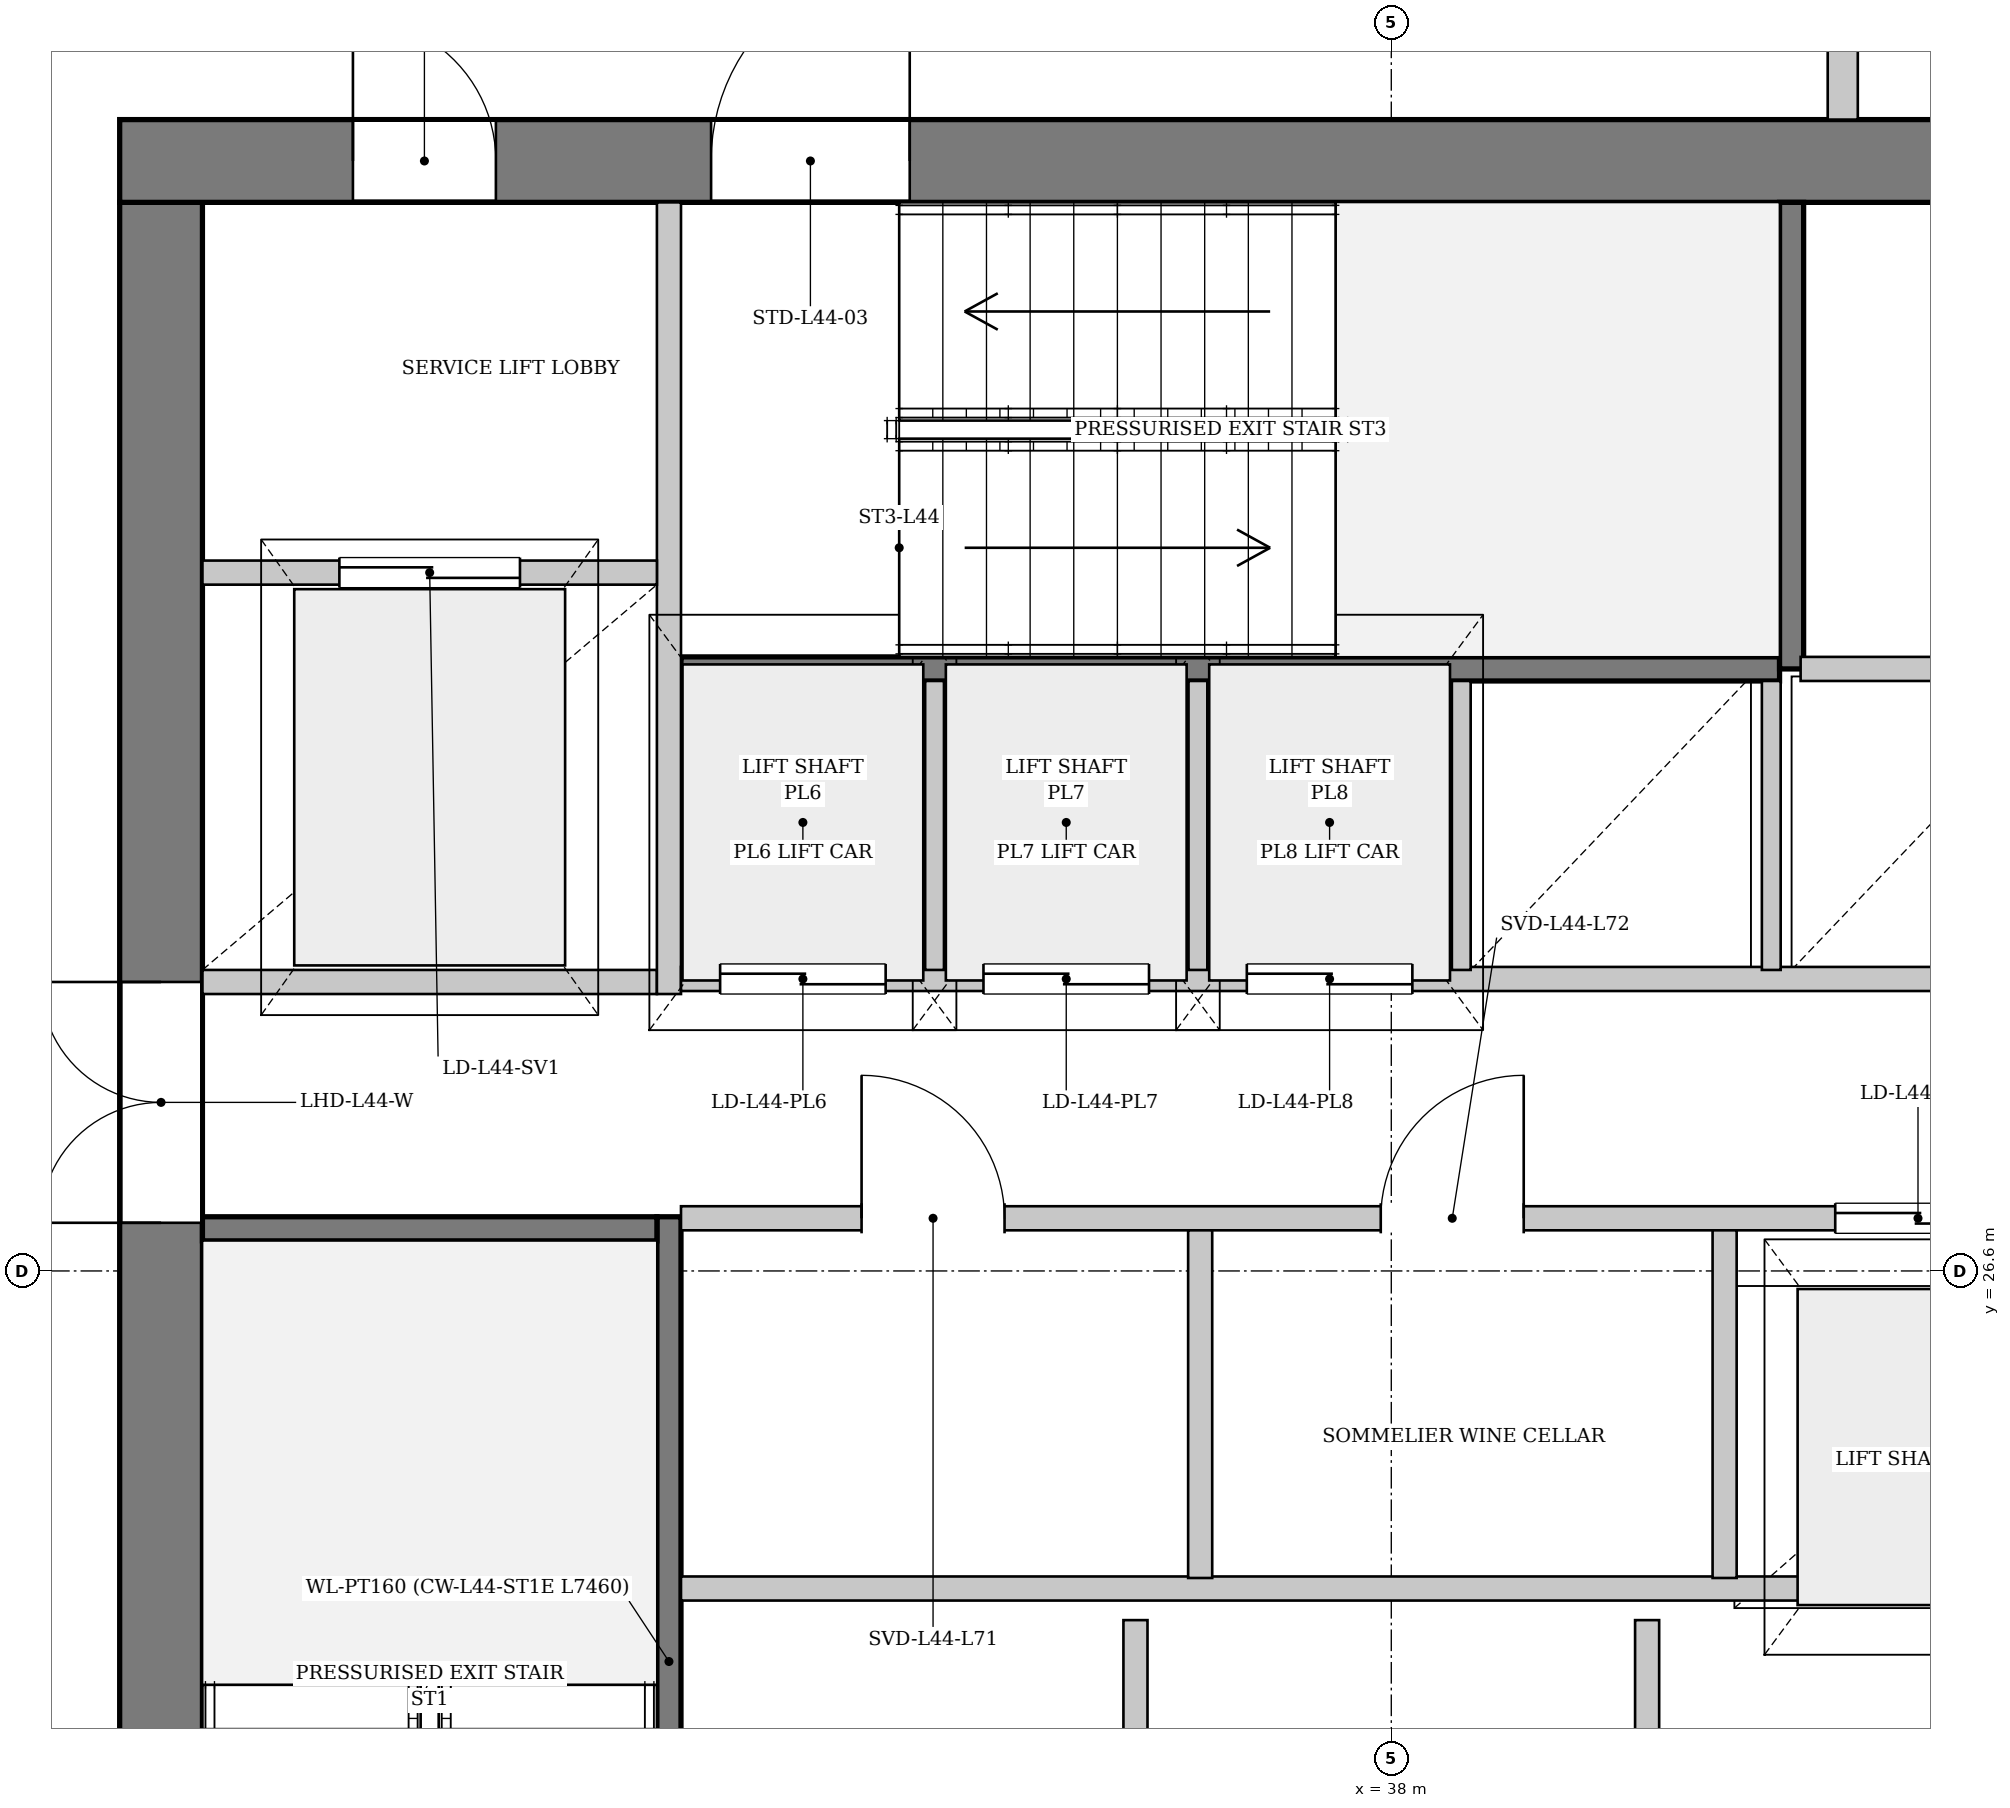
"""IFC4 building model, lengths in metres.
Left out: names, types, materials, properties, quantities, classifications, styles, units other than length and angle.
Written with IfcOpenShell. Run it as: python <this file> out.ifc"""

import sys

from ifc_helpers import new_model, si_unit, direction, frame, frame_2d, origin, place, context, subcontext, project, spatial, rectangle, extrude, source, transform, mapped, element, fill, save


model = new_model("IFC4")
c1 = context("Model", 3, precision=1e-05, world=origin(), true_north=direction((0.0, 1.0)))
c2 = subcontext(c1, "Body", "Model", "MODEL_VIEW")
j1 = project(units=[si_unit("LENGTHUNIT", "METRE"), si_unit("PLANEANGLEUNIT", "RADIAN")], contexts=[c1])
p1 = place(None, origin())
s1 = spatial("IfcSite", under=j1, at=p1, CompositionType="ELEMENT")
p2 = place(p1, origin())
s2 = spatial("IfcBuilding", under=s1, at=p2, CompositionType="ELEMENT")
p3 = place(p2, frame((0.0, 0.0, 167.9)))
s3 = spatial("IfcBuildingStorey", under=s2, at=p3, CompositionType="ELEMENT", Elevation=167.9)
p4 = place(p3, frame((29.825, 19.5, 0.0), z_axis=(0.0, 0.0, 1.0), x_axis=(0.0, 1.0, 0.0)))
e1 = element("IfcWall", 1, at=p4, inside=s3, PredefinedType="SHEAR", context=c2, shape_type="SweptSolid", body=[
    extrude(rectangle(XDim=14.2, YDim=0.55, at=frame_2d((7.1, 0.0))), origin(), (0.0, 0.0, 1.0), 3.33),
])
p5 = place(p4, frame((7.42, 0.0, 0.0)))
e2 = element("IfcOpeningElement", 2, at=p5, cuts=e1, PredefinedType="OPENING", context=c2, shape_type="SweptSolid", body=[
    extrude(rectangle(XDim=1.6, YDim=2.2, at=frame_2d((0.8, 1.1))), frame((0.0, 0.285, 0.0), z_axis=(0.0, -1.0, 0.0), x_axis=(1.0, 0.0, 0.0)), (0.0, 0.0, 1.0), 0.57),
])
p6 = place(p3, frame((29.55, 33.975, 0.0), z_axis=(0.0, 0.0, 1.0), x_axis=(1.0, 0.0, 0.0)))
e3 = element("IfcWall", 3, at=p6, inside=s3, PredefinedType="SHEAR", context=c2, shape_type="SweptSolid", body=[
    extrude(rectangle(XDim=16.9, YDim=0.55, at=frame_2d((8.45, 0.0))), origin(), (0.0, 0.0, 1.0), 3.33),
])
p7 = place(p6, frame((1.55, 0.0, 0.0)))
e4 = element("IfcOpeningElement", 4, at=p7, cuts=e3, PredefinedType="OPENING", context=c2, shape_type="SweptSolid", body=[
    extrude(rectangle(XDim=0.95, YDim=2.1, at=frame_2d((0.475, 1.05))), frame((0.0, 0.285, 0.0), z_axis=(0.0, -1.0, 0.0), x_axis=(1.0, 0.0, 0.0)), (0.0, 0.0, 1.0), 0.57),
])
p8 = place(p6, frame((3.93, 0.0, 0.0)))
e5 = element("IfcOpeningElement", 5, at=p8, cuts=e3, PredefinedType="OPENING", context=c2, shape_type="SweptSolid", body=[
    extrude(rectangle(XDim=1.32, YDim=2.2, at=frame_2d((0.66, 1.1))), frame((0.0, 0.285, 0.0), z_axis=(0.0, -1.0, 0.0), x_axis=(1.0, 0.0, 0.0)), (0.0, 0.0, 1.0), 0.57),
])
p9 = place(p3, frame((33.2, 19.5, 0.0), z_axis=(0.0, 0.0, 1.0), x_axis=(0.0, 1.0, 0.0)))
e6 = element("IfcWall", 6, at=p9, inside=s3, PredefinedType="PARTITIONING", context=c2, shape_type="SweptSolid", body=[
    extrude(rectangle(XDim=7.46, YDim=0.16, at=frame_2d((3.73, 0.0))), origin(), (0.0, 0.0, 1.0), 3.33),
])
p10 = place(p9, frame((0.08, 0.0, 0.0)))
e7 = element("IfcOpeningElement", 7, at=p10, cuts=e6, PredefinedType="OPENING", context=c2, shape_type="SweptSolid", body=[
    extrude(rectangle(XDim=1.32, YDim=2.2, at=frame_2d((0.66, 1.1))), frame((0.0, 0.09, 0.0), z_axis=(0.0, -1.0, 0.0), x_axis=(1.0, 0.0, 0.0)), (0.0, 0.0, 1.0), 0.18),
])
p11 = place(p3, frame((30.1, 26.88, 0.0), z_axis=(0.0, 0.0, 1.0), x_axis=(1.0, 0.0, 0.0)))
e8 = element("IfcWall", 8, at=p11, inside=s3, PredefinedType="PARTITIONING", context=c2, shape_type="SweptSolid", body=[
    extrude(rectangle(XDim=3.02, YDim=0.16, at=frame_2d((1.51, 0.0))), origin(), (0.0, 0.0, 1.0), 3.33),
])
p12 = place(p3, frame((33.28, 30.6, 0.0), z_axis=(0.0, 0.0, 1.0), x_axis=(1.0, 0.0, 0.0)))
e9 = element("IfcWall", 9, at=p12, inside=s3, PredefinedType="PARTITIONING", context=c2, shape_type="SweptSolid", body=[
    extrude(rectangle(XDim=7.3, YDim=0.16, at=frame_2d((3.65, 0.0))), origin(), (0.0, 0.0, 1.0), 3.33),
])
p13 = place(p3, frame((40.66, 30.6, 0.0), z_axis=(0.0, 0.0, 1.0), x_axis=(0.0, 1.0, 0.0)))
e10 = element("IfcWall", 10, at=p13, inside=s3, PredefinedType="PARTITIONING", context=c2, shape_type="SweptSolid", body=[
    extrude(rectangle(XDim=3.1, YDim=0.16, at=frame_2d((1.55, 0.0))), origin(), (0.0, 0.0, 1.0), 3.33),
])
p14 = place(p3, frame((36.3, 19.5, 0.0), z_axis=(0.0, 0.0, 1.0), x_axis=(0.0, 1.0, 0.0)))
e11 = element("IfcWall", 11, at=p14, inside=s3, PredefinedType="PARTITIONING", context=c2, shape_type="SweptSolid", body=[
    extrude(rectangle(XDim=4.78, YDim=0.16, at=frame_2d((2.39, 0.0))), origin(), (0.0, 0.0, 1.0), 3.33),
])
p15 = place(p14, frame((0.6, 0.0, 0.0)))
e12 = element("IfcOpeningElement", 12, at=p15, cuts=e11, PredefinedType="OPENING", context=c2, shape_type="SweptSolid", body=[
    extrude(rectangle(XDim=1.2, YDim=2.2, at=frame_2d((0.6, 1.1))), frame((0.0, 0.09, 0.0), z_axis=(0.0, -1.0, 0.0), x_axis=(1.0, 0.0, 0.0)), (0.0, 0.0, 1.0), 0.18),
])
p16 = place(p14, frame((2.65, 0.0, 0.0)))
e13 = element("IfcOpeningElement", 13, at=p16, cuts=e11, PredefinedType="OPENING", context=c2, shape_type="SweptSolid", body=[
    extrude(rectangle(XDim=0.95, YDim=2.1, at=frame_2d((0.475, 1.05))), frame((0.0, 0.09, 0.0), z_axis=(0.0, -1.0, 0.0), x_axis=(1.0, 0.0, 0.0)), (0.0, 0.0, 1.0), 0.18),
])
p17 = place(p3, frame((39.7, 24.28, 0.0), z_axis=(0.0, 0.0, 1.0), x_axis=(0.0, -1.0, 0.0)))
e14 = element("IfcWall", 14, at=p17, inside=s3, PredefinedType="PARTITIONING", context=c2, shape_type="SweptSolid", body=[
    extrude(rectangle(XDim=4.78, YDim=0.16, at=frame_2d((2.39, 0.0))), origin(), (0.0, 0.0, 1.0), 3.33),
])
p18 = place(p17, frame((3.12, 0.0, 0.0)))
e15 = element("IfcOpeningElement", 15, at=p18, cuts=e14, PredefinedType="OPENING", context=c2, shape_type="SweptSolid", body=[
    extrude(rectangle(XDim=1.2, YDim=2.2, at=frame_2d((0.6, 1.1))), frame((0.0, 0.09, 0.0), z_axis=(0.0, -1.0, 0.0), x_axis=(1.0, 0.0, 0.0)), (0.0, 0.0, 1.0), 0.18),
])
p19 = place(p3, frame((33.28, 24.49, 0.0), z_axis=(0.0, 0.0, 1.0), x_axis=(1.0, 0.0, 0.0)))
e16 = element("IfcWall", 16, at=p19, inside=s3, PredefinedType="PARTITIONING", context=c2, shape_type="SweptSolid", body=[
    extrude(rectangle(XDim=9.44, YDim=0.16, at=frame_2d((4.72, 0.0))), origin(), (0.0, 0.0, 1.0), 3.33),
])
p20 = place(p3, frame((30.1, 28.52, 0.0), z_axis=(0.0, 0.0, 1.0), x_axis=(1.0, 0.0, 0.0)))
e17 = element("IfcWall", 17, at=p20, inside=s3, PredefinedType="PARTITIONING", context=c2, shape_type="SweptSolid", body=[
    extrude(rectangle(XDim=3.02, YDim=0.16, at=frame_2d((1.51, 0.0))), origin(), (0.0, 0.0, 1.0), 3.33),
])
p21 = place(p3, frame((33.2, 28.44, 0.0), z_axis=(0.0, 0.0, 1.0), x_axis=(0.0, 1.0, 0.0)))
e18 = element("IfcWall", 18, at=p21, inside=s3, PredefinedType="PARTITIONING", context=c2, shape_type="SweptSolid", body=[
    extrude(rectangle(XDim=5.26, YDim=0.16, at=frame_2d((2.63, 0.0))), origin(), (0.0, 0.0, 1.0), 3.33),
])
p22 = place(p3, frame((30.1, 31.24, 0.0), z_axis=(0.0, 0.0, 1.0), x_axis=(1.0, 0.0, 0.0)))
e19 = element("IfcWall", 19, at=p22, inside=s3, PredefinedType="PARTITIONING", context=c2, shape_type="SweptSolid", body=[
    extrude(rectangle(XDim=3.02, YDim=0.16, at=frame_2d((1.51, 0.0))), origin(), (0.0, 0.0, 1.0), 3.33),
])
p23 = place(p22, frame((0.91, 0.0, 0.0)))
e20 = element("IfcOpeningElement", 20, at=p23, cuts=e19, PredefinedType="OPENING", context=c2, shape_type="SweptSolid", body=[
    extrude(rectangle(XDim=1.2, YDim=2.2, at=frame_2d((0.6, 1.1))), frame((0.0, 0.09, 0.0), z_axis=(0.0, -1.0, 0.0), x_axis=(1.0, 0.0, 0.0)), (0.0, 0.0, 1.0), 0.18),
])
p24 = place(p3, frame((33.28, 26.95, 0.0), z_axis=(0.0, 0.0, 1.0), x_axis=(1.0, 0.0, 0.0)))
e21 = element("IfcWall", 21, at=p24, inside=s3, PredefinedType="PARTITIONING", context=c2, shape_type="SweptSolid", body=[
    extrude(rectangle(XDim=9.44, YDim=0.16, at=frame_2d((4.72, 0.0))), origin(), (0.0, 0.0, 1.0), 3.33),
])
p25 = place(p24, frame((1.2, 0.0, 0.0)))
e22 = element("IfcOpeningElement", 22, at=p25, cuts=e21, PredefinedType="OPENING", context=c2, shape_type="SweptSolid", body=[
    extrude(rectangle(XDim=0.95, YDim=2.1, at=frame_2d((0.475, 1.05))), frame((0.0, 0.09, 0.0), z_axis=(0.0, -1.0, 0.0), x_axis=(1.0, 0.0, 0.0)), (0.0, 0.0, 1.0), 0.18),
])
p26 = place(p24, frame((4.65, 0.0, 0.0)))
e23 = element("IfcOpeningElement", 23, at=p26, cuts=e21, PredefinedType="OPENING", context=c2, shape_type="SweptSolid", body=[
    extrude(rectangle(XDim=0.95, YDim=2.1, at=frame_2d((0.475, 1.05))), frame((0.0, 0.09, 0.0), z_axis=(0.0, -1.0, 0.0), x_axis=(1.0, 0.0, 0.0)), (0.0, 0.0, 1.0), 0.18),
])
p27 = place(p24, frame((7.67, 0.0, 0.0)))
e24 = element("IfcOpeningElement", 24, at=p27, cuts=e21, PredefinedType="OPENING", context=c2, shape_type="SweptSolid", body=[
    extrude(rectangle(XDim=1.1, YDim=2.2, at=frame_2d((0.55, 1.1))), frame((0.0, 0.09, 0.0), z_axis=(0.0, -1.0, 0.0), x_axis=(1.0, 0.0, 0.0)), (0.0, 0.0, 1.0), 0.18),
])
for number, where, z_axis, x_axis in (
    (25, (36.73, 24.56, 0.0), (0.0, 0.0, 1.0), (0.0, 1.0, 0.0)),
    (26, (40.215, 24.56, 0.0), (0.0, 0.0, 1.0), (0.0, 1.0, 0.0)),
):
    element("IfcWall", number, at=place(p3, frame(where, z_axis=z_axis, x_axis=x_axis)), inside=s3, PredefinedType="PARTITIONING", context=c2, shape_type="SweptSolid", body=[
        extrude(rectangle(XDim=2.31, YDim=0.16, at=frame_2d((1.155, 0.0))), origin(), (0.0, 0.0, 1.0), 3.33),
    ])
p28 = place(p3, frame((33.28, 28.54, 0.0), z_axis=(0.0, 0.0, 1.0), x_axis=(1.0, 0.0, 0.0)))
e27 = element("IfcWall", 27, at=p28, inside=s3, PredefinedType="PARTITIONING", context=c2, shape_type="SweptSolid", body=[
    extrude(rectangle(XDim=12.62, YDim=0.16, at=frame_2d((6.31, 0.0))), origin(), (0.0, 0.0, 1.0), 3.33),
])
p29 = place(p28, frame((0.26, 0.0, 0.0)))
e28 = element("IfcOpeningElement", 28, at=p29, cuts=e27, PredefinedType="OPENING", context=c2, shape_type="SweptSolid", body=[
    extrude(rectangle(XDim=1.1, YDim=2.2, at=frame_2d((0.55, 1.1))), frame((0.0, 0.09, 0.0), z_axis=(0.0, -1.0, 0.0), x_axis=(1.0, 0.0, 0.0)), (0.0, 0.0, 1.0), 0.18),
])
p30 = place(p28, frame((2.01, 0.0, 0.0)))
e29 = element("IfcOpeningElement", 29, at=p30, cuts=e27, PredefinedType="OPENING", context=c2, shape_type="SweptSolid", body=[
    extrude(rectangle(XDim=1.1, YDim=2.2, at=frame_2d((0.55, 1.1))), frame((0.0, 0.09, 0.0), z_axis=(0.0, -1.0, 0.0), x_axis=(1.0, 0.0, 0.0)), (0.0, 0.0, 1.0), 0.18),
])
p31 = place(p28, frame((3.76, 0.0, 0.0)))
e30 = element("IfcOpeningElement", 30, at=p31, cuts=e27, PredefinedType="OPENING", context=c2, shape_type="SweptSolid", body=[
    extrude(rectangle(XDim=1.1, YDim=2.2, at=frame_2d((0.55, 1.1))), frame((0.0, 0.09, 0.0), z_axis=(0.0, -1.0, 0.0), x_axis=(1.0, 0.0, 0.0)), (0.0, 0.0, 1.0), 0.18),
])
p32 = place(p3, frame((40.72, 30.6, 0.0), z_axis=(0.0, 0.0, 1.0), x_axis=(1.0, 0.0, 0.0)))
e31 = element("IfcWall", 31, at=p32, inside=s3, PredefinedType="PARTITIONING", context=c2, shape_type="SweptSolid", body=[
    extrude(rectangle(XDim=5.18, YDim=0.16, at=frame_2d((2.59, 0.0))), origin(), (0.0, 0.0, 1.0), 3.33),
])
for number, where, z_axis, x_axis in (
    (32, (34.965, 28.6, 0.0), (0.0, 0.0, 1.0), (0.0, 1.0, 0.0)),
    (33, (36.715, 28.6, 0.0), (0.0, 0.0, 1.0), (0.0, 1.0, 0.0)),
    (34, (38.465, 28.6, 0.0), (0.0, 0.0, 1.0), (0.0, 1.0, 0.0)),
    (35, (40.525, 28.6, 0.0), (0.0, 0.0, 1.0), (0.0, 1.0, 0.0)),
):
    element("IfcWall", number, at=place(p3, frame(where, z_axis=z_axis, x_axis=x_axis)), inside=s3, PredefinedType="PARTITIONING", context=c2, shape_type="SweptSolid", body=[
        extrude(rectangle(XDim=1.92, YDim=0.125, at=frame_2d((0.96, 0.0))), origin(), (0.0, 0.0, 1.0), 3.33),
    ])
p33 = place(p3, frame((41.0, 34.25, 0.0), z_axis=(0.0, 0.0, 1.0), x_axis=(0.0, 1.0, 0.0)))
e36 = element("IfcWall", 36, at=p33, inside=s3, PredefinedType="PARTITIONING", context=c2, shape_type="SweptSolid", body=[
    extrude(rectangle(XDim=1.95, YDim=0.2, at=frame_2d((0.975, 0.0))), origin(), (0.0, 0.0, 1.0), 3.33),
])
m1 = source(origin(), c2, "Body", "SweptSolid", [
    extrude(rectangle(XDim=1.6, YDim=2.2, at=frame_2d((0.8, 1.1))), frame((0.0, 0.025, 0.0), z_axis=(0.0, -1.0, 0.0), x_axis=(1.0, 0.0, 0.0)), (0.0, 0.0, 1.0), 0.05),
])
p34 = place(p5, origin())
e37 = element("IfcDoor", 37, at=p34, inside=s3, OperationType="DOUBLE_DOOR_SINGLE_SWING", PredefinedType="DOOR", context=c2, shape_type="MappedRepresentation", body=[
    mapped(m1, transform((0.0, 0.0, 0.0), x_axis=(1.0, 0.0, 0.0), y_axis=(0.0, 1.0, 0.0), z_axis=(0.0, 0.0, 1.0), scale=1.0)),
])
fill(e2, e37)
m2 = source(origin(), c2, "Body", "SweptSolid", [
    extrude(rectangle(XDim=0.95, YDim=2.1, at=frame_2d((0.475, 1.05))), frame((0.0, 0.025, 0.0), z_axis=(0.0, -1.0, 0.0), x_axis=(1.0, 0.0, 0.0)), (0.0, 0.0, 1.0), 0.05),
])
p35 = place(p7, origin())
e38 = element("IfcDoor", 38, at=p35, inside=s3, OperationType="SINGLE_SWING_LEFT", PredefinedType="DOOR", context=c2, shape_type="MappedRepresentation", body=[
    mapped(m2, transform((0.0, 0.0, 0.0), x_axis=(1.0, 0.0, 0.0), y_axis=(0.0, 1.0, 0.0), z_axis=(0.0, 0.0, 1.0), scale=1.0)),
])
fill(e4, e38)
m3 = source(origin(), c2, "Body", "SweptSolid", [
    extrude(rectangle(XDim=1.32, YDim=2.2, at=frame_2d((0.66, 1.1))), frame((0.0, 0.025, 0.0), z_axis=(0.0, -1.0, 0.0), x_axis=(1.0, 0.0, 0.0)), (0.0, 0.0, 1.0), 0.05),
])
p36 = place(p8, origin())
e39 = element("IfcDoor", 39, at=p36, inside=s3, OperationType="SINGLE_SWING_RIGHT", PredefinedType="DOOR", context=c2, shape_type="MappedRepresentation", body=[
    mapped(m3, transform((0.0, 0.0, 0.0), x_axis=(1.0, 0.0, 0.0), y_axis=(0.0, 1.0, 0.0), z_axis=(0.0, 0.0, 1.0), scale=1.0)),
])
fill(e5, e39)
m4 = source(origin(), c2, "Body", "SweptSolid", [
    extrude(rectangle(XDim=1.2, YDim=2.2, at=frame_2d((0.6, 1.1))), frame((0.0, 0.025, 0.0), z_axis=(0.0, -1.0, 0.0), x_axis=(1.0, 0.0, 0.0)), (0.0, 0.0, 1.0), 0.05),
])
p37 = place(p23, origin())
e40 = element("IfcDoor", 40, at=p37, inside=s3, OperationType="DOUBLE_DOOR_SLIDING", PredefinedType="DOOR", context=c2, shape_type="MappedRepresentation", body=[
    mapped(m4, transform((0.0, 0.0, 0.0), x_axis=(1.0, 0.0, 0.0), y_axis=(0.0, 1.0, 0.0), z_axis=(0.0, 0.0, 1.0), scale=1.0)),
])
fill(e20, e40)
p38 = place(p25, origin())
e41 = element("IfcDoor", 41, at=p38, inside=s3, OperationType="SINGLE_SWING_LEFT", PredefinedType="DOOR", context=c2, shape_type="MappedRepresentation", body=[
    mapped(m2, transform((0.0, 0.0, 0.0), x_axis=(1.0, 0.0, 0.0), y_axis=(0.0, 1.0, 0.0), z_axis=(0.0, 0.0, 1.0), scale=1.0)),
])
fill(e22, e41)
p39 = place(p26, origin())
e42 = element("IfcDoor", 42, at=p39, inside=s3, OperationType="SINGLE_SWING_RIGHT", PredefinedType="DOOR", context=c2, shape_type="MappedRepresentation", body=[
    mapped(m2, transform((0.0, 0.0, 0.0), x_axis=(1.0, 0.0, 0.0), y_axis=(0.0, 1.0, 0.0), z_axis=(0.0, 0.0, 1.0), scale=1.0)),
])
fill(e23, e42)
m5 = source(origin(), c2, "Body", "SweptSolid", [
    extrude(rectangle(XDim=1.1, YDim=2.2, at=frame_2d((0.55, 1.1))), frame((0.0, 0.025, 0.0), z_axis=(0.0, -1.0, 0.0), x_axis=(1.0, 0.0, 0.0)), (0.0, 0.0, 1.0), 0.05),
])
p40 = place(p27, origin())
e43 = element("IfcDoor", 43, at=p40, inside=s3, OperationType="DOUBLE_DOOR_SLIDING", PredefinedType="DOOR", context=c2, shape_type="MappedRepresentation", body=[
    mapped(m5, transform((0.0, 0.0, 0.0), x_axis=(1.0, 0.0, 0.0), y_axis=(0.0, 1.0, 0.0), z_axis=(0.0, 0.0, 1.0), scale=1.0)),
])
fill(e24, e43)
p41 = place(p29, origin())
e44 = element("IfcDoor", 44, at=p41, inside=s3, OperationType="DOUBLE_DOOR_SLIDING", PredefinedType="DOOR", context=c2, shape_type="MappedRepresentation", body=[
    mapped(m5, transform((0.0, 0.0, 0.0), x_axis=(1.0, 0.0, 0.0), y_axis=(0.0, 1.0, 0.0), z_axis=(0.0, 0.0, 1.0), scale=1.0)),
])
fill(e28, e44)
p42 = place(p30, origin())
e45 = element("IfcDoor", 45, at=p42, inside=s3, OperationType="DOUBLE_DOOR_SLIDING", PredefinedType="DOOR", context=c2, shape_type="MappedRepresentation", body=[
    mapped(m5, transform((0.0, 0.0, 0.0), x_axis=(1.0, 0.0, 0.0), y_axis=(0.0, 1.0, 0.0), z_axis=(0.0, 0.0, 1.0), scale=1.0)),
])
fill(e29, e45)
p43 = place(p31, origin())
e46 = element("IfcDoor", 46, at=p43, inside=s3, OperationType="DOUBLE_DOOR_SLIDING", PredefinedType="DOOR", context=c2, shape_type="MappedRepresentation", body=[
    mapped(m5, transform((0.0, 0.0, 0.0), x_axis=(1.0, 0.0, 0.0), y_axis=(0.0, 1.0, 0.0), z_axis=(0.0, 0.0, 1.0), scale=1.0)),
])
fill(e30, e46)
save(model, sys.argv[1])
